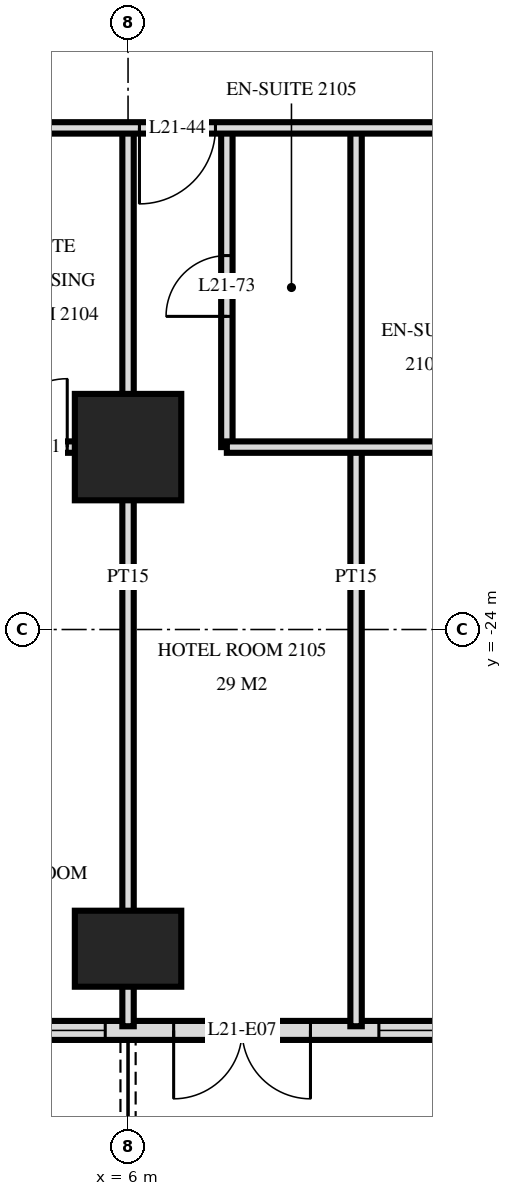
"""IFC4 building model, lengths in metres.
Left out: names, types, materials, properties, quantities, classifications, styles, units other than length and angle.
Written with IfcOpenShell. Run it as: python <this file> out.ifc"""

import sys

from ifc_helpers import new_model, si_unit, direction, frame, frame_2d, origin, origin_2d, place, context, subcontext, project, spatial, rectangle, extrude, element, fill, save


model = new_model("IFC4")
c1 = context("Model", 3, precision=1e-05, world=origin(), true_north=direction((0.0, 1.0)))
c2 = subcontext(c1, "Body", "Model", "MODEL_VIEW")
j1 = project(units=[si_unit("LENGTHUNIT", "METRE"), si_unit("PLANEANGLEUNIT", "RADIAN")], contexts=[c1])
p1 = place(None, origin())
s1 = spatial("IfcSite", under=j1, at=p1, CompositionType="ELEMENT")
p2 = place(p1, origin())
s2 = spatial("IfcBuilding", under=s1, at=p2, CompositionType="ELEMENT")
p3 = place(p2, frame((0.0, 0.0, 85.2)))
s3 = spatial("IfcBuildingStorey", under=s2, at=p3, CompositionType="ELEMENT", Elevation=85.2)
p4 = place(p3, frame((6.0, -28.2, 0.0), z_axis=(0.0, 0.0, 1.0), x_axis=(1.0, 0.0, 0.0)))
e1 = element("IfcColumn", 1, at=p4, inside=s3, PredefinedType="COLUMN", context=c2, shape_type="SweptSolid", body=[
    extrude(rectangle(XDim=1.4, YDim=1.0, at=origin_2d()), origin(), (0.0, 0.0, 1.0), 3.6),
])
p5 = place(p3, frame((6.0, -21.6, 0.0), z_axis=(0.0, 0.0, 1.0), x_axis=(1.0, 0.0, 0.0)))
e2 = element("IfcColumn", 2, at=p5, inside=s3, PredefinedType="COLUMN", context=c2, shape_type="SweptSolid", body=[
    extrude(rectangle(XDim=1.4, YDim=1.4, at=origin_2d()), origin(), (0.0, 0.0, 1.0), 3.6),
])
p6 = place(p3, frame((-28.775, -29.275, 0.0), z_axis=(0.0, 0.0, 1.0), x_axis=(1.0, 0.0, 0.0)))
e3 = element("IfcWall", 3, at=p6, inside=s3, PredefinedType="SOLIDWALL", context=c2, shape_type="SweptSolid", body=[
    extrude(rectangle(XDim=57.551, YDim=0.25, at=frame_2d((28.775, 0.0))), origin(), (0.0, 0.0, 1.0), 3.32),
])
p7 = place(p6, frame((0.575, 0.0, 0.0)))
e4 = element("IfcOpeningElement", 4, at=p7, cuts=e3, PredefinedType="OPENING", context=c2, shape_type="SweptSolid", body=[
    extrude(rectangle(XDim=1.8, YDim=2.4, at=frame_2d((0.9, 1.2))), frame((0.0, 0.135, 0.0), z_axis=(0.0, -1.0, 0.0), x_axis=(1.0, 0.0, 0.0)), (0.0, 0.0, 1.0), 0.27),
])
p8 = place(p6, frame((5.375, 0.0, 0.0)))
e5 = element("IfcOpeningElement", 5, at=p8, cuts=e3, PredefinedType="OPENING", context=c2, shape_type="SweptSolid", body=[
    extrude(rectangle(XDim=1.8, YDim=2.4, at=frame_2d((0.9, 1.2))), frame((0.0, 0.135, 0.0), z_axis=(0.0, -1.0, 0.0), x_axis=(1.0, 0.0, 0.0)), (0.0, 0.0, 1.0), 0.27),
])
p9 = place(p6, frame((8.075, 0.0, 0.3)))
e6 = element("IfcOpeningElement", 6, at=p9, cuts=e3, PredefinedType="OPENING", context=c2, shape_type="SweptSolid", body=[
    extrude(rectangle(XDim=2.4, YDim=2.1, at=frame_2d((1.2, 1.05))), frame((0.0, 0.135, 0.0), z_axis=(0.0, -1.0, 0.0), x_axis=(1.0, 0.0, 0.0)), (0.0, 0.0, 1.0), 0.27),
])
p10 = place(p6, frame((11.375, 0.0, 0.0)))
e7 = element("IfcOpeningElement", 7, at=p10, cuts=e3, PredefinedType="OPENING", context=c2, shape_type="SweptSolid", body=[
    extrude(rectangle(XDim=1.8, YDim=2.4, at=frame_2d((0.9, 1.2))), frame((0.0, 0.135, 0.0), z_axis=(0.0, -1.0, 0.0), x_axis=(1.0, 0.0, 0.0)), (0.0, 0.0, 1.0), 0.27),
])
p11 = place(p6, frame((14.075, 0.0, 0.3)))
e8 = element("IfcOpeningElement", 8, at=p11, cuts=e3, PredefinedType="OPENING", context=c2, shape_type="SweptSolid", body=[
    extrude(rectangle(XDim=2.4, YDim=2.1, at=frame_2d((1.2, 1.05))), frame((0.0, 0.135, 0.0), z_axis=(0.0, -1.0, 0.0), x_axis=(1.0, 0.0, 0.0)), (0.0, 0.0, 1.0), 0.27),
])
p12 = place(p6, frame((17.075, 0.0, 0.3)))
e9 = element("IfcOpeningElement", 9, at=p12, cuts=e3, PredefinedType="OPENING", context=c2, shape_type="SweptSolid", body=[
    extrude(rectangle(XDim=2.4, YDim=2.1, at=frame_2d((1.2, 1.05))), frame((0.0, 0.135, 0.0), z_axis=(0.0, -1.0, 0.0), x_axis=(1.0, 0.0, 0.0)), (0.0, 0.0, 1.0), 0.27),
])
p13 = place(p6, frame((20.375, 0.0, 0.0)))
e10 = element("IfcOpeningElement", 10, at=p13, cuts=e3, PredefinedType="OPENING", context=c2, shape_type="SweptSolid", body=[
    extrude(rectangle(XDim=1.8, YDim=2.4, at=frame_2d((0.9, 1.2))), frame((0.0, 0.135, 0.0), z_axis=(0.0, -1.0, 0.0), x_axis=(1.0, 0.0, 0.0)), (0.0, 0.0, 1.0), 0.27),
])
p14 = place(p6, frame((23.375, 0.0, 0.0)))
e11 = element("IfcOpeningElement", 11, at=p14, cuts=e3, PredefinedType="OPENING", context=c2, shape_type="SweptSolid", body=[
    extrude(rectangle(XDim=1.8, YDim=2.4, at=frame_2d((0.9, 1.2))), frame((0.0, 0.135, 0.0), z_axis=(0.0, -1.0, 0.0), x_axis=(1.0, 0.0, 0.0)), (0.0, 0.0, 1.0), 0.27),
])
p15 = place(p6, frame((26.075, 0.0, 0.3)))
e12 = element("IfcOpeningElement", 12, at=p15, cuts=e3, PredefinedType="OPENING", context=c2, shape_type="SweptSolid", body=[
    extrude(rectangle(XDim=2.4, YDim=2.1, at=frame_2d((1.2, 1.05))), frame((0.0, 0.135, 0.0), z_axis=(0.0, -1.0, 0.0), x_axis=(1.0, 0.0, 0.0)), (0.0, 0.0, 1.0), 0.27),
])
p16 = place(p6, frame((29.375, 0.0, 0.0)))
e13 = element("IfcOpeningElement", 13, at=p16, cuts=e3, PredefinedType="OPENING", context=c2, shape_type="SweptSolid", body=[
    extrude(rectangle(XDim=1.8, YDim=2.4, at=frame_2d((0.9, 1.2))), frame((0.0, 0.135, 0.0), z_axis=(0.0, -1.0, 0.0), x_axis=(1.0, 0.0, 0.0)), (0.0, 0.0, 1.0), 0.27),
])
p17 = place(p6, frame((32.075, 0.0, 0.3)))
e14 = element("IfcOpeningElement", 14, at=p17, cuts=e3, PredefinedType="OPENING", context=c2, shape_type="SweptSolid", body=[
    extrude(rectangle(XDim=2.4, YDim=2.1, at=frame_2d((1.2, 1.05))), frame((0.0, 0.135, 0.0), z_axis=(0.0, -1.0, 0.0), x_axis=(1.0, 0.0, 0.0)), (0.0, 0.0, 1.0), 0.27),
])
p18 = place(p6, frame((35.375, 0.0, 0.0)))
e15 = element("IfcOpeningElement", 15, at=p18, cuts=e3, PredefinedType="OPENING", context=c2, shape_type="SweptSolid", body=[
    extrude(rectangle(XDim=1.8, YDim=2.4, at=frame_2d((0.9, 1.2))), frame((0.0, 0.135, 0.0), z_axis=(0.0, -1.0, 0.0), x_axis=(1.0, 0.0, 0.0)), (0.0, 0.0, 1.0), 0.27),
])
p19 = place(p6, frame((38.075, 0.0, 0.3)))
e16 = element("IfcOpeningElement", 16, at=p19, cuts=e3, PredefinedType="OPENING", context=c2, shape_type="SweptSolid", body=[
    extrude(rectangle(XDim=2.4, YDim=2.1, at=frame_2d((1.2, 1.05))), frame((0.0, 0.135, 0.0), z_axis=(0.0, -1.0, 0.0), x_axis=(1.0, 0.0, 0.0)), (0.0, 0.0, 1.0), 0.27),
])
p20 = place(p6, frame((41.375, 0.0, 0.0)))
e17 = element("IfcOpeningElement", 17, at=p20, cuts=e3, PredefinedType="OPENING", context=c2, shape_type="SweptSolid", body=[
    extrude(rectangle(XDim=1.8, YDim=2.4, at=frame_2d((0.9, 1.2))), frame((0.0, 0.135, 0.0), z_axis=(0.0, -1.0, 0.0), x_axis=(1.0, 0.0, 0.0)), (0.0, 0.0, 1.0), 0.27),
])
p21 = place(p6, frame((44.075, 0.0, 0.3)))
e18 = element("IfcOpeningElement", 18, at=p21, cuts=e3, PredefinedType="OPENING", context=c2, shape_type="SweptSolid", body=[
    extrude(rectangle(XDim=2.4, YDim=2.1, at=frame_2d((1.2, 1.05))), frame((0.0, 0.135, 0.0), z_axis=(0.0, -1.0, 0.0), x_axis=(1.0, 0.0, 0.0)), (0.0, 0.0, 1.0), 0.27),
])
p22 = place(p6, frame((47.075, 0.0, 0.3)))
e19 = element("IfcOpeningElement", 19, at=p22, cuts=e3, PredefinedType="OPENING", context=c2, shape_type="SweptSolid", body=[
    extrude(rectangle(XDim=2.4, YDim=2.1, at=frame_2d((1.2, 1.05))), frame((0.0, 0.135, 0.0), z_axis=(0.0, -1.0, 0.0), x_axis=(1.0, 0.0, 0.0)), (0.0, 0.0, 1.0), 0.27),
])
p23 = place(p6, frame((50.375, 0.0, 0.0)))
e20 = element("IfcOpeningElement", 20, at=p23, cuts=e3, PredefinedType="OPENING", context=c2, shape_type="SweptSolid", body=[
    extrude(rectangle(XDim=1.8, YDim=2.4, at=frame_2d((0.9, 1.2))), frame((0.0, 0.135, 0.0), z_axis=(0.0, -1.0, 0.0), x_axis=(1.0, 0.0, 0.0)), (0.0, 0.0, 1.0), 0.27),
])
p24 = place(p6, frame((53.375, 0.0, 0.0)))
e21 = element("IfcOpeningElement", 21, at=p24, cuts=e3, PredefinedType="OPENING", context=c2, shape_type="SweptSolid", body=[
    extrude(rectangle(XDim=1.8, YDim=2.4, at=frame_2d((0.9, 1.2))), frame((0.0, 0.135, 0.0), z_axis=(0.0, -1.0, 0.0), x_axis=(1.0, 0.0, 0.0)), (0.0, 0.0, 1.0), 0.27),
])
p25 = place(p3, frame((9.0, -29.22, 0.0), z_axis=(0.0, 0.0, 1.0), x_axis=(0.0, 1.0, 0.0)))
e22 = element("IfcWall", 22, at=p25, inside=s3, PredefinedType="PARTITIONING", context=c2, shape_type="SweptSolid", body=[
    extrude(rectangle(XDim=11.82, YDim=0.15, at=frame_2d((5.91, 0.0))), origin(), (0.0, 0.0, 1.0), 3.32),
])
p26 = place(p3, frame((7.3, -21.6, 0.0), z_axis=(0.0, 0.0, 1.0), x_axis=(0.0, 1.0, 0.0)))
e23 = element("IfcWall", 23, at=p26, inside=s3, PredefinedType="PARTITIONING", context=c2, shape_type="SweptSolid", body=[
    extrude(rectangle(XDim=4.2, YDim=0.15, at=frame_2d((2.1, 0.0))), origin(), (0.0, 0.0, 1.0), 3.32),
])
p27 = place(p26, frame((1.72, 0.0, 0.0)))
e24 = element("IfcOpeningElement", 24, at=p27, cuts=e23, PredefinedType="OPENING", context=c2, shape_type="SweptSolid", body=[
    extrude(rectangle(XDim=0.8, YDim=2.1, at=frame_2d((0.4, 1.05))), frame((0.0, 0.085, 0.0), z_axis=(0.0, -1.0, 0.0), x_axis=(1.0, 0.0, 0.0)), (0.0, 0.0, 1.0), 0.17),
])
p28 = place(p3, frame((6.0, -29.22, 0.0), z_axis=(0.0, 0.0, 1.0), x_axis=(0.0, 1.0, 0.0)))
e25 = element("IfcWall", 25, at=p28, inside=s3, PredefinedType="PARTITIONING", context=c2, shape_type="SweptSolid", body=[
    extrude(rectangle(XDim=11.82, YDim=0.15, at=frame_2d((5.91, 0.0))), origin(), (0.0, 0.0, 1.0), 3.32),
])
p29 = place(p3, frame((0.9, -21.6, 0.0), z_axis=(0.0, 0.0, 1.0), x_axis=(1.0, 0.0, 0.0)))
e26 = element("IfcWall", 26, at=p29, inside=s3, PredefinedType="PARTITIONING", context=c2, shape_type="SweptSolid", body=[
    extrude(rectangle(XDim=5.1, YDim=0.15, at=frame_2d((2.55, 0.0))), origin(), (0.0, 0.0, 1.0), 3.32),
])
p30 = place(p29, frame((0.63, 0.0, 0.0)))
e27 = element("IfcOpeningElement", 27, at=p30, cuts=e26, PredefinedType="OPENING", context=c2, shape_type="SweptSolid", body=[
    extrude(rectangle(XDim=0.8, YDim=2.1, at=frame_2d((0.4, 1.05))), frame((0.0, 0.085, 0.0), z_axis=(0.0, -1.0, 0.0), x_axis=(1.0, 0.0, 0.0)), (0.0, 0.0, 1.0), 0.17),
])
p31 = place(p29, frame((3.4, 0.0, 0.0)))
e28 = element("IfcOpeningElement", 28, at=p31, cuts=e26, PredefinedType="OPENING", context=c2, shape_type="SweptSolid", body=[
    extrude(rectangle(XDim=0.9, YDim=2.1, at=frame_2d((0.45, 1.05))), frame((0.0, 0.085, 0.0), z_axis=(0.0, -1.0, 0.0), x_axis=(1.0, 0.0, 0.0)), (0.0, 0.0, 1.0), 0.17),
])
p32 = place(p3, frame((7.3, -21.6, 0.0), z_axis=(0.0, 0.0, 1.0), x_axis=(1.0, 0.0, 0.0)))
e29 = element("IfcWall", 29, at=p32, inside=s3, PredefinedType="PARTITIONING", context=c2, shape_type="SweptSolid", body=[
    extrude(rectangle(XDim=4.4, YDim=0.15, at=frame_2d((2.2, 0.0))), origin(), (0.0, 0.0, 1.0), 3.32),
])
p33 = place(p3, frame((-33.12, -17.4, 0.0), z_axis=(0.0, 0.0, 1.0), x_axis=(1.0, 0.0, 0.0)))
e30 = element("IfcWall", 30, at=p33, inside=s3, PredefinedType="PARTITIONING", context=c2, shape_type="SweptSolid", body=[
    extrude(rectangle(XDim=66.24, YDim=0.15, at=frame_2d((33.12, 0.0))), origin(), (0.0, 0.0, 1.0), 3.32),
])
p34 = place(p33, frame((10.27, 0.0, 0.0)))
e31 = element("IfcOpeningElement", 31, at=p34, cuts=e30, PredefinedType="OPENING", context=c2, shape_type="SweptSolid", body=[
    extrude(rectangle(XDim=1.0, YDim=2.1, at=frame_2d((0.5, 1.05))), frame((0.0, 0.085, 0.0), z_axis=(0.0, -1.0, 0.0), x_axis=(1.0, 0.0, 0.0)), (0.0, 0.0, 1.0), 0.17),
])
p35 = place(p33, frame((16.97, 0.0, 0.0)))
e32 = element("IfcOpeningElement", 32, at=p35, cuts=e30, PredefinedType="OPENING", context=c2, shape_type="SweptSolid", body=[
    extrude(rectangle(XDim=1.0, YDim=2.1, at=frame_2d((0.5, 1.05))), frame((0.0, 0.085, 0.0), z_axis=(0.0, -1.0, 0.0), x_axis=(1.0, 0.0, 0.0)), (0.0, 0.0, 1.0), 0.17),
])
p36 = place(p33, frame((28.42, 0.0, 0.0)))
e33 = element("IfcOpeningElement", 33, at=p36, cuts=e30, PredefinedType="OPENING", context=c2, shape_type="SweptSolid", body=[
    extrude(rectangle(XDim=1.0, YDim=2.1, at=frame_2d((0.5, 1.05))), frame((0.0, 0.085, 0.0), z_axis=(0.0, -1.0, 0.0), x_axis=(1.0, 0.0, 0.0)), (0.0, 0.0, 1.0), 0.17),
])
p37 = place(p33, frame((30.82, 0.0, 0.0)))
e34 = element("IfcOpeningElement", 34, at=p37, cuts=e30, PredefinedType="OPENING", context=c2, shape_type="SweptSolid", body=[
    extrude(rectangle(XDim=1.0, YDim=2.1, at=frame_2d((0.5, 1.05))), frame((0.0, 0.085, 0.0), z_axis=(0.0, -1.0, 0.0), x_axis=(1.0, 0.0, 0.0)), (0.0, 0.0, 1.0), 0.17),
])
p38 = place(p33, frame((39.27, 0.0, 0.0)))
e35 = element("IfcOpeningElement", 35, at=p38, cuts=e30, PredefinedType="OPENING", context=c2, shape_type="SweptSolid", body=[
    extrude(rectangle(XDim=1.0, YDim=2.1, at=frame_2d((0.5, 1.05))), frame((0.0, 0.085, 0.0), z_axis=(0.0, -1.0, 0.0), x_axis=(1.0, 0.0, 0.0)), (0.0, 0.0, 1.0), 0.17),
])
p39 = place(p33, frame((45.22, 0.0, 0.0)))
e36 = element("IfcOpeningElement", 36, at=p39, cuts=e30, PredefinedType="OPENING", context=c2, shape_type="SweptSolid", body=[
    extrude(rectangle(XDim=1.0, YDim=2.1, at=frame_2d((0.5, 1.05))), frame((0.0, 0.085, 0.0), z_axis=(0.0, -1.0, 0.0), x_axis=(1.0, 0.0, 0.0)), (0.0, 0.0, 1.0), 0.17),
])
p40 = place(p33, frame((48.27, 0.0, 0.0)))
e37 = element("IfcOpeningElement", 37, at=p40, cuts=e30, PredefinedType="OPENING", context=c2, shape_type="SweptSolid", body=[
    extrude(rectangle(XDim=1.0, YDim=2.1, at=frame_2d((0.5, 1.05))), frame((0.0, 0.085, 0.0), z_axis=(0.0, -1.0, 0.0), x_axis=(1.0, 0.0, 0.0)), (0.0, 0.0, 1.0), 0.17),
])
p41 = place(p33, frame((1.87, 0.0, 0.0)))
e38 = element("IfcOpeningElement", 38, at=p41, cuts=e30, PredefinedType="OPENING", context=c2, shape_type="SweptSolid", body=[
    extrude(rectangle(XDim=1.0, YDim=2.1, at=frame_2d((0.5, 1.05))), frame((0.0, 0.085, 0.0), z_axis=(0.0, -1.0, 0.0), x_axis=(1.0, 0.0, 0.0)), (0.0, 0.0, 1.0), 0.17),
])
p42 = place(p33, frame((60.37, 0.0, 0.0)))
e39 = element("IfcOpeningElement", 39, at=p42, cuts=e30, PredefinedType="OPENING", context=c2, shape_type="SweptSolid", body=[
    extrude(rectangle(XDim=1.0, YDim=2.1, at=frame_2d((0.5, 1.05))), frame((0.0, 0.085, 0.0), z_axis=(0.0, -1.0, 0.0), x_axis=(1.0, 0.0, 0.0)), (0.0, 0.0, 1.0), 0.17),
])
p43 = place(p17, origin())
e40 = element("IfcWindow", 40, at=p43, inside=s3, PartitioningType="SINGLE_PANEL", PredefinedType="WINDOW", context=c2, shape_type="SweptSolid", body=[
    extrude(rectangle(XDim=2.4, YDim=2.1, at=frame_2d((1.2, 1.05))), frame((0.0, 0.03, 0.0), z_axis=(0.0, -1.0, 0.0), x_axis=(1.0, 0.0, 0.0)), (0.0, 0.0, 1.0), 0.06),
])
fill(e14, e40)
p44 = place(p18, frame((0.9, 0.0, 0.0), z_axis=(0.0, 0.0, 1.0), x_axis=(-1.0, 0.0, 0.0)))
e41 = element("IfcDoor", 41, at=p44, inside=s3, OperationType="DOUBLE_DOOR_SINGLE_SWING", PredefinedType="DOOR", context=c2, shape_type="SweptSolid", body=[
    extrude(rectangle(XDim=1.8, YDim=2.4, at=frame_2d((0.0, 1.2))), frame((0.0, -0.025, 0.0), z_axis=(0.0, 1.0, 0.0), x_axis=(-1.0, 0.0, 0.0)), (0.0, 0.0, 1.0), 0.05),
])
fill(e15, e41)
p45 = place(p19, origin())
e42 = element("IfcWindow", 42, at=p45, inside=s3, PartitioningType="SINGLE_PANEL", PredefinedType="WINDOW", context=c2, shape_type="SweptSolid", body=[
    extrude(rectangle(XDim=2.4, YDim=2.1, at=frame_2d((1.2, 1.05))), frame((0.0, 0.03, 0.0), z_axis=(0.0, -1.0, 0.0), x_axis=(1.0, 0.0, 0.0)), (0.0, 0.0, 1.0), 0.06),
])
fill(e16, e42)
p46 = place(p38, frame((0.5, 0.0, 0.0), z_axis=(0.0, 0.0, 1.0), x_axis=(-1.0, 0.0, 0.0)))
e43 = element("IfcDoor", 43, at=p46, inside=s3, OperationType="SINGLE_SWING_LEFT", PredefinedType="DOOR", context=c2, shape_type="SweptSolid", body=[
    extrude(rectangle(XDim=1.0, YDim=2.1, at=frame_2d((0.0, 1.05))), frame((0.0, -0.025, 0.0), z_axis=(0.0, 1.0, 0.0), x_axis=(-1.0, 0.0, 0.0)), (0.0, 0.0, 1.0), 0.05),
])
fill(e35, e43)
p47 = place(p31, origin())
e44 = element("IfcDoor", 44, at=p47, inside=s3, OperationType="SINGLE_SWING_LEFT", PredefinedType="DOOR", context=c2, shape_type="SweptSolid", body=[
    extrude(rectangle(XDim=0.9, YDim=2.1, at=frame_2d((0.45, 1.05))), frame((0.0, 0.025, 0.0), z_axis=(0.0, -1.0, 0.0), x_axis=(1.0, 0.0, 0.0)), (0.0, 0.0, 1.0), 0.05),
])
fill(e28, e44)
p48 = place(p27, origin())
e45 = element("IfcDoor", 45, at=p48, inside=s3, OperationType="SINGLE_SWING_RIGHT", PredefinedType="DOOR", context=c2, shape_type="SweptSolid", body=[
    extrude(rectangle(XDim=0.8, YDim=2.1, at=frame_2d((0.4, 1.05))), frame((0.0, 0.025, 0.0), z_axis=(0.0, -1.0, 0.0), x_axis=(1.0, 0.0, 0.0)), (0.0, 0.0, 1.0), 0.05),
])
fill(e24, e45)
save(model, sys.argv[1])
